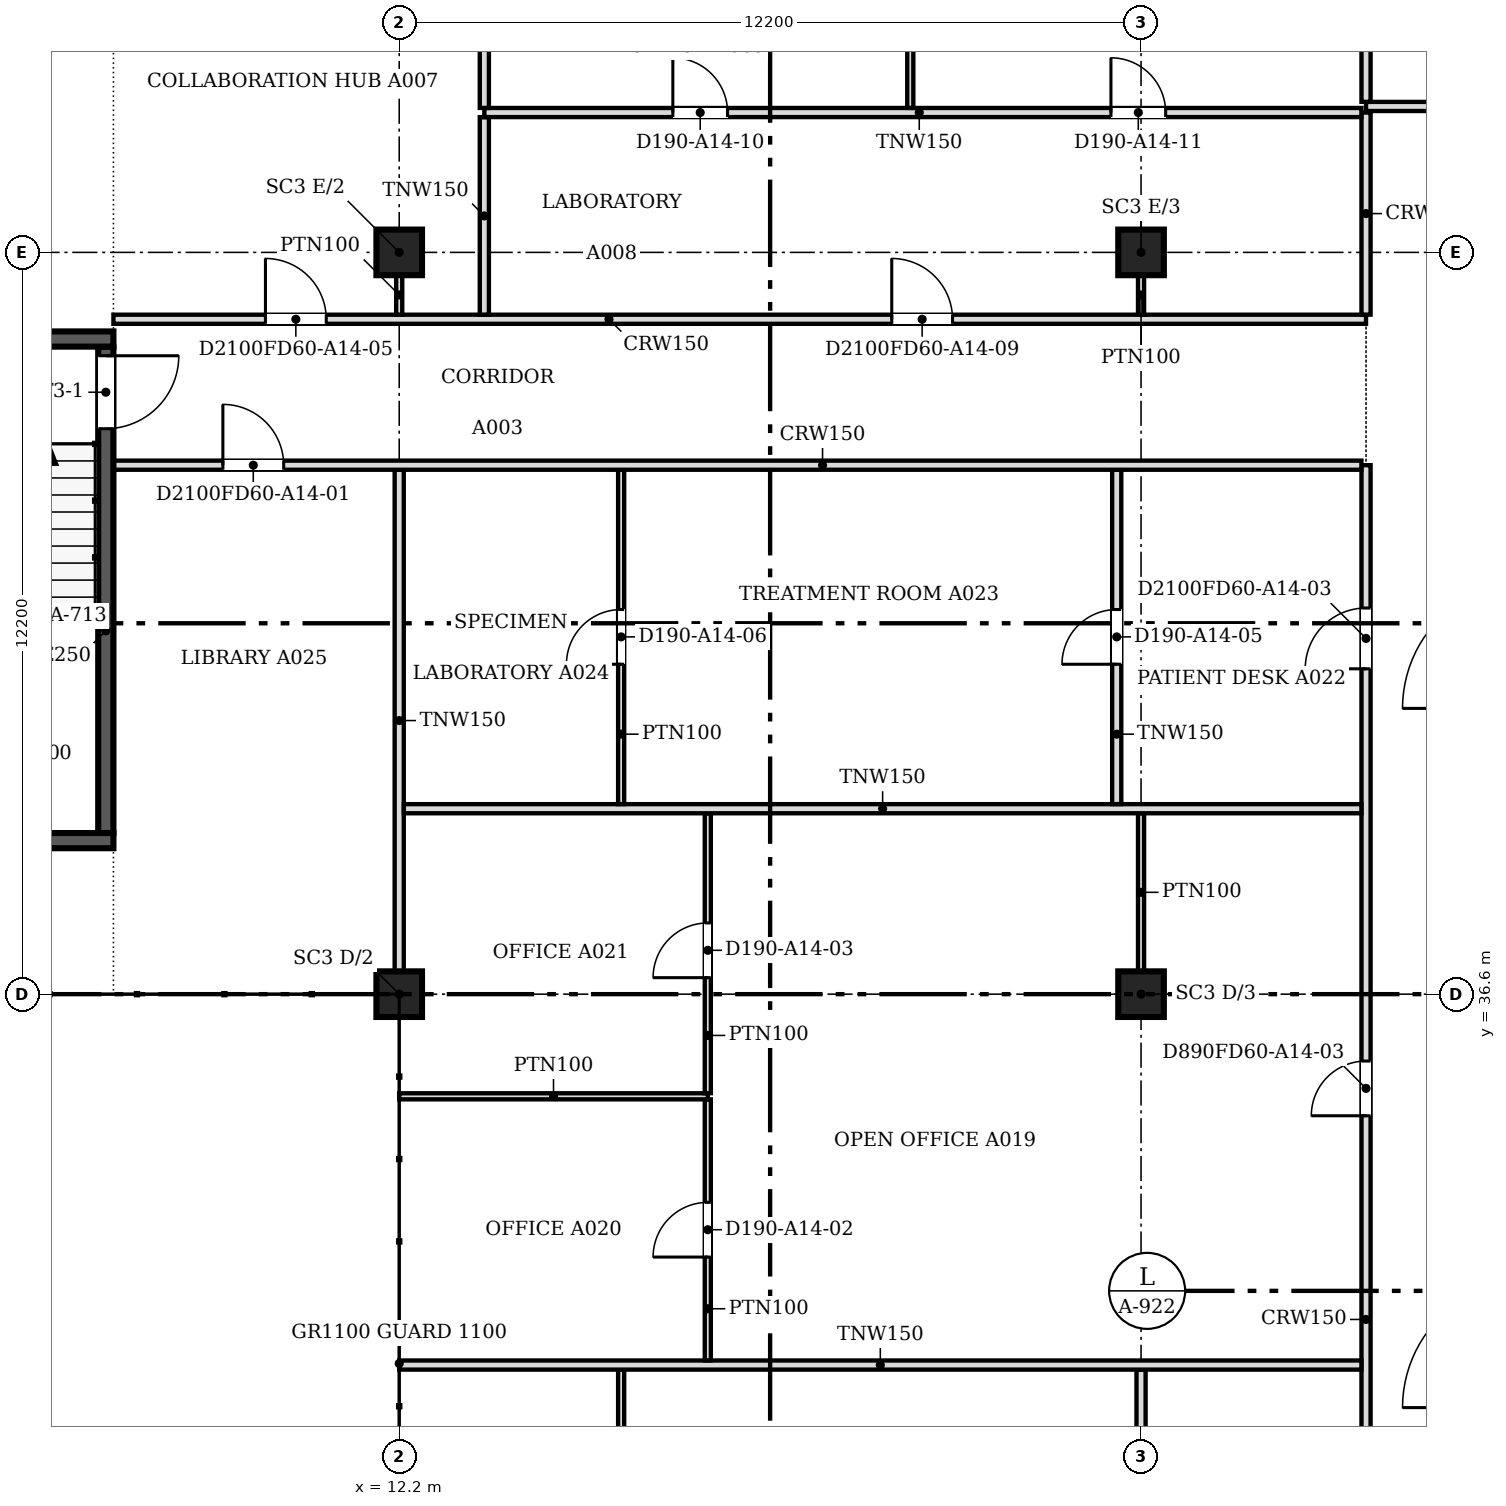
"""IFC4 building model, lengths in metres.
Left out: names, types, materials, properties, quantities, classifications, styles, units other than length and angle.
Written with IfcOpenShell. Run it as: python <this file> out.ifc"""

import sys

from ifc_helpers import new_model, si_unit, direction, frame, frame_2d, origin, origin_2d, place, context, subcontext, project, spatial, rectangle, extrude, source, transform, mapped, element, fill, save


model = new_model("IFC4")
c1 = context("Model", 3, precision=1e-05, world=origin(), true_north=direction((0.0, 1.0)))
c2 = subcontext(c1, "Body", "Model", "MODEL_VIEW")
j1 = project(units=[si_unit("LENGTHUNIT", "METRE"), si_unit("PLANEANGLEUNIT", "RADIAN")], contexts=[c1])
p1 = place(None, origin())
s1 = spatial("IfcSite", under=j1, at=p1, CompositionType="ELEMENT")
p2 = place(p1, origin())
s2 = spatial("IfcBuilding", under=s1, at=p2, CompositionType="ELEMENT")
p3 = place(p2, frame((0.0, 0.0, 155.4)))
s3 = spatial("IfcBuildingStorey", under=s2, at=p3, CompositionType="ELEMENT", Elevation=155.4)
for number, where, z_axis, x_axis in (
    (1, (12.2, 36.6, 0.0), (0.0, 0.0, 1.0), (1.0, 0.0, 0.0)),
    (2, (12.2, 48.8, 0.0), (0.0, 0.0, 1.0), (1.0, 0.0, 0.0)),
    (3, (24.4, 36.6, 0.0), (0.0, 0.0, 1.0), (1.0, 0.0, 0.0)),
    (4, (24.4, 48.8, 0.0), (0.0, 0.0, 1.0), (1.0, 0.0, 0.0)),
):
    element("IfcColumn", number, at=place(p3, frame(where, z_axis=z_axis, x_axis=x_axis)), inside=s3, PredefinedType="COLUMN", context=c2, shape_type="SweptSolid", body=[
        extrude(rectangle(XDim=0.75, YDim=0.75, at=origin_2d()), origin(), (0.0, 0.0, 1.0), 3.6),
    ])
for number, where, z_axis, x_axis in (
    (5, (7.5, 39.125, 0.0), (0.0, 0.0, 1.0), (-1.0, 0.0, 0.0)),
    (6, (3.6, 47.375, 0.0), (0.0, 0.0, 1.0), (1.0, 0.0, 0.0)),
):
    element("IfcWall", number, at=place(p3, frame(where, z_axis=z_axis, x_axis=x_axis)), inside=s3, PredefinedType="SOLIDWALL", context=c2, shape_type="SweptSolid", body=[
        extrude(rectangle(XDim=3.9, YDim=0.25, at=frame_2d((1.95, 0.0))), origin(), (0.0, 0.0, 1.0), 3.8),
    ])
p4 = place(p3, frame((7.375, 47.25, 0.0), z_axis=(0.0, 0.0, 1.0), x_axis=(0.0, -1.0, 0.0)))
e7 = element("IfcWall", 7, at=p4, inside=s3, PredefinedType="SOLIDWALL", context=c2, shape_type="SweptSolid", body=[
    extrude(rectangle(XDim=8.0, YDim=0.25, at=frame_2d((4.0, 0.0))), origin(), (0.0, 0.0, 1.0), 3.8),
])
m1 = source(origin(), c2, "Body", "SweptSolid", [
    extrude(rectangle(XDim=1.2, YDim=2.1, at=frame_2d((0.6, 1.05))), frame((0.0, 0.135, 0.0), z_axis=(0.0, -1.0, 0.0), x_axis=(1.0, 0.0, 0.0)), (0.0, 0.0, 1.0), 0.27),
])
p5 = place(p4, frame((0.15, 0.0, 0.0)))
e8 = element("IfcOpeningElement", 8, at=p5, cuts=e7, PredefinedType="OPENING", context=c2, shape_type="MappedRepresentation", body=[
    mapped(m1, transform((0.0, 0.0, 0.0), scale=1.0)),
])
p6 = place(p3, frame((28.1, 18.8, 0.0), z_axis=(0.0, 0.0, 1.0), x_axis=(0.0, 1.0, 0.0)))
e9 = element("IfcWall", 9, at=p6, inside=s3, PredefinedType="PARTITIONING", context=c2, shape_type="SweptSolid", body=[
    extrude(rectangle(XDim=26.5, YDim=0.15, at=frame_2d((13.25, 0.0))), origin(), (0.0, 0.0, 1.0), 3.067),
])
m2 = source(origin(), c2, "Body", "SweptSolid", [
    extrude(rectangle(XDim=0.9, YDim=2.1, at=frame_2d((0.45, 1.05))), frame((0.0, 0.085, 0.0), z_axis=(0.0, -1.0, 0.0), x_axis=(1.0, 0.0, 0.0)), (0.0, 0.0, 1.0), 0.17),
])
p7 = place(p6, frame((1.1, 0.0, 0.0)))
e10 = element("IfcOpeningElement", 10, at=p7, cuts=e9, PredefinedType="OPENING", context=c2, shape_type="MappedRepresentation", body=[
    mapped(m2, transform((0.0, 0.0, 0.0), scale=1.0)),
])
m3 = source(origin(), c2, "Body", "SweptSolid", [
    extrude(rectangle(XDim=1.0, YDim=2.1, at=frame_2d((0.5, 1.05))), frame((0.0, 0.085, 0.0), z_axis=(0.0, -1.0, 0.0), x_axis=(1.0, 0.0, 0.0)), (0.0, 0.0, 1.0), 0.17),
])
p8 = place(p6, frame((23.151, 0.0, 0.0)))
e11 = element("IfcOpeningElement", 11, at=p8, cuts=e9, PredefinedType="OPENING", context=c2, shape_type="MappedRepresentation", body=[
    mapped(m3, transform((0.0, 0.0, 0.0), scale=1.0)),
])
p9 = place(p6, frame((8.1, 0.0, 0.0)))
e12 = element("IfcOpeningElement", 12, at=p9, cuts=e9, PredefinedType="OPENING", context=c2, shape_type="MappedRepresentation", body=[
    mapped(m3, transform((0.0, 0.0, 0.0), scale=1.0)),
])
p10 = place(p6, frame((15.8, 0.0, 0.0)))
e13 = element("IfcOpeningElement", 13, at=p10, cuts=e9, PredefinedType="OPENING", context=c2, shape_type="MappedRepresentation", body=[
    mapped(m2, transform((0.0, 0.0, 0.0), scale=1.0)),
])
p11 = place(p3, frame((15.85, 24.476, 0.0), z_axis=(0.0, 0.0, 1.0), x_axis=(0.0, 1.0, 0.0)))
e14 = element("IfcWall", 14, at=p11, inside=s3, PredefinedType="PARTITIONING", context=c2, shape_type="SweptSolid", body=[
    extrude(rectangle(XDim=5.948, YDim=0.1, at=frame_2d((2.974, 0.0))), origin(), (0.0, 0.0, 1.0), 3.067),
])
m4 = source(origin(), c2, "Body", "SweptSolid", [
    extrude(rectangle(XDim=0.9, YDim=2.1, at=frame_2d((0.45, 1.05))), frame((0.0, 0.06, 0.0), z_axis=(0.0, -1.0, 0.0), x_axis=(1.0, 0.0, 0.0)), (0.0, 0.0, 1.0), 0.12),
])
p12 = place(p11, frame((2.5, 0.0, 0.0)))
e15 = element("IfcOpeningElement", 15, at=p12, cuts=e14, PredefinedType="OPENING", context=c2, shape_type="MappedRepresentation", body=[
    mapped(m4, transform((0.0, 0.0, 0.0), scale=1.0)),
])
p13 = place(p3, frame((24.4, 24.776, 0.0), z_axis=(0.0, 0.0, 1.0), x_axis=(0.0, 1.0, 0.0)))
e16 = element("IfcWall", 16, at=p13, inside=s3, PredefinedType="PARTITIONING", context=c2, shape_type="SweptSolid", body=[
    extrude(rectangle(XDim=5.648, YDim=0.15, at=frame_2d((2.824, 0.0))), origin(), (0.0, 0.0, 1.0), 3.067),
])
p14 = place(p13, frame((2.4, 0.0, 0.0)))
e17 = element("IfcOpeningElement", 17, at=p14, cuts=e16, PredefinedType="OPENING", context=c2, shape_type="MappedRepresentation", body=[
    mapped(m2, transform((0.0, 0.0, 0.0), scale=1.0)),
])
p15 = place(p3, frame((12.2, 30.5, 0.0), z_axis=(0.0, 0.0, 1.0), x_axis=(1.0, 0.0, 0.0)))
e18 = element("IfcWall", 18, at=p15, inside=s3, PredefinedType="PARTITIONING", context=c2, shape_type="SweptSolid", body=[
    extrude(rectangle(XDim=15.824, YDim=0.15, at=frame_2d((7.912, 0.0))), origin(), (0.0, 0.0, 1.0), 3.067),
])
p16 = place(p3, frame((17.275, 30.576, 0.0), z_axis=(0.0, 0.0, 1.0), x_axis=(0.0, 1.0, 0.0)))
e19 = element("IfcWall", 19, at=p16, inside=s3, PredefinedType="PARTITIONING", context=c2, shape_type="SweptSolid", body=[
    extrude(rectangle(XDim=4.293, YDim=0.1, at=frame_2d((2.147, 0.0))), origin(), (0.0, 0.0, 1.0), 3.067),
])
p17 = place(p16, frame((1.7, 0.0, 0.0)))
e20 = element("IfcOpeningElement", 20, at=p17, cuts=e19, PredefinedType="OPENING", context=c2, shape_type="MappedRepresentation", body=[
    mapped(m4, transform((0.0, 0.0, 0.0), scale=1.0)),
])
p18 = place(p3, frame((12.2, 34.92, 0.0), z_axis=(0.0, 0.0, 1.0), x_axis=(1.0, 0.0, 0.0)))
e21 = element("IfcWall", 21, at=p18, inside=s3, PredefinedType="PARTITIONING", context=c2, shape_type="SweptSolid", body=[
    extrude(rectangle(XDim=5.075, YDim=0.1, at=frame_2d((2.538, 0.0))), origin(), (0.0, 0.0, 1.0), 3.067),
])
p19 = place(p3, frame((17.275, 34.971, 0.0), z_axis=(0.0, 0.0, 1.0), x_axis=(0.0, 1.0, 0.0)))
e22 = element("IfcWall", 22, at=p19, inside=s3, PredefinedType="PARTITIONING", context=c2, shape_type="SweptSolid", body=[
    extrude(rectangle(XDim=4.603, YDim=0.1, at=frame_2d((2.301, 0.0))), origin(), (0.0, 0.0, 1.0), 3.067),
])
p20 = place(p19, frame((1.9, 0.0, 0.0)))
e23 = element("IfcOpeningElement", 23, at=p20, cuts=e22, PredefinedType="OPENING", context=c2, shape_type="MappedRepresentation", body=[
    mapped(m4, transform((0.0, 0.0, 0.0), scale=1.0)),
])
p21 = place(p3, frame((12.2, 36.976, 0.0), z_axis=(0.0, 0.0, 1.0), x_axis=(0.0, 1.0, 0.0)))
e24 = element("IfcWall", 24, at=p21, inside=s3, PredefinedType="PARTITIONING", context=c2, shape_type="SweptSolid", body=[
    extrude(rectangle(XDim=8.248, YDim=0.15, at=frame_2d((4.124, 0.0))), origin(), (0.0, 0.0, 1.0), 3.067),
])
p22 = place(p3, frame((24.4, 36.975, 0.0), z_axis=(0.0, 0.0, 1.0), x_axis=(0.0, 1.0, 0.0)))
e25 = element("IfcWall", 25, at=p22, inside=s3, PredefinedType="PARTITIONING", context=c2, shape_type="SweptSolid", body=[
    extrude(rectangle(XDim=2.6, YDim=0.1, at=frame_2d((1.3, 0.0))), origin(), (0.0, 0.0, 1.0), 3.067),
])
p23 = place(p3, frame((12.276, 39.65, 0.0), z_axis=(0.0, 0.0, 1.0), x_axis=(1.0, 0.0, 0.0)))
e26 = element("IfcWall", 26, at=p23, inside=s3, PredefinedType="PARTITIONING", context=c2, shape_type="SweptSolid", body=[
    extrude(rectangle(XDim=15.748, YDim=0.15, at=frame_2d((7.874, 0.0))), origin(), (0.0, 0.0, 1.0), 3.067),
])
p24 = place(p3, frame((15.85, 39.726, 0.0), z_axis=(0.0, 0.0, 1.0), x_axis=(0.0, 1.0, 0.0)))
e27 = element("IfcWall", 27, at=p24, inside=s3, PredefinedType="PARTITIONING", context=c2, shape_type="SweptSolid", body=[
    extrude(rectangle(XDim=5.498, YDim=0.1, at=frame_2d((2.749, 0.0))), origin(), (0.0, 0.0, 1.0), 3.067),
])
p25 = place(p24, frame((2.3, 0.0, 0.0)))
e28 = element("IfcOpeningElement", 28, at=p25, cuts=e27, PredefinedType="OPENING", context=c2, shape_type="MappedRepresentation", body=[
    mapped(m4, transform((0.0, 0.0, 0.0), scale=1.0)),
])
p26 = place(p3, frame((24.0, 39.726, 0.0), z_axis=(0.0, 0.0, 1.0), x_axis=(0.0, 1.0, 0.0)))
e29 = element("IfcWall", 29, at=p26, inside=s3, PredefinedType="PARTITIONING", context=c2, shape_type="SweptSolid", body=[
    extrude(rectangle(XDim=5.498, YDim=0.15, at=frame_2d((2.749, 0.0))), origin(), (0.0, 0.0, 1.0), 3.067),
])
p27 = place(p26, frame((2.3, 0.0, 0.0)))
e30 = element("IfcOpeningElement", 30, at=p27, cuts=e29, PredefinedType="OPENING", context=c2, shape_type="MappedRepresentation", body=[
    mapped(m2, transform((0.0, 0.0, 0.0), scale=1.0)),
])
p28 = place(p3, frame((28.024, 45.3, 0.0), z_axis=(0.0, 0.0, 1.0), x_axis=(-1.0, 0.0, 0.0)))
e31 = element("IfcWall", 31, at=p28, inside=s3, PredefinedType="PARTITIONING", context=c2, shape_type="SweptSolid", body=[
    extrude(rectangle(XDim=20.524, YDim=0.15, at=frame_2d((10.262, 0.0))), origin(), (0.0, 0.0, 1.0), 3.067),
])
p29 = place(p28, frame((17.724, 0.0, 0.0)))
e32 = element("IfcOpeningElement", 32, at=p29, cuts=e31, PredefinedType="OPENING", context=c2, shape_type="MappedRepresentation", body=[
    mapped(m3, transform((0.0, 0.0, 0.0), scale=1.0)),
])
p30 = place(p3, frame((7.5, 47.7, 0.0), z_axis=(0.0, 0.0, 1.0), x_axis=(1.0, 0.0, 0.0)))
e33 = element("IfcWall", 33, at=p30, inside=s3, PredefinedType="PARTITIONING", context=c2, shape_type="SweptSolid", body=[
    extrude(rectangle(XDim=20.6, YDim=0.15, at=frame_2d((10.3, 0.0))), origin(), (0.0, 0.0, 1.0), 3.067),
])
p31 = place(p30, frame((2.5, 0.0, 0.0)))
e34 = element("IfcOpeningElement", 34, at=p31, cuts=e33, PredefinedType="OPENING", context=c2, shape_type="MappedRepresentation", body=[
    mapped(m3, transform((0.0, 0.0, 0.0), scale=1.0)),
])
p32 = place(p30, frame((12.8, 0.0, 0.0)))
e35 = element("IfcOpeningElement", 35, at=p32, cuts=e33, PredefinedType="OPENING", context=c2, shape_type="MappedRepresentation", body=[
    mapped(m3, transform((0.0, 0.0, 0.0), scale=1.0)),
])
p33 = place(p3, frame((13.6, 47.776, 0.0), z_axis=(0.0, 0.0, 1.0), x_axis=(0.0, 1.0, 0.0)))
e36 = element("IfcWall", 36, at=p33, inside=s3, PredefinedType="PARTITIONING", context=c2, shape_type="SweptSolid", body=[
    extrude(rectangle(XDim=3.248, YDim=0.15, at=frame_2d((1.624, 0.0))), origin(), (0.0, 0.0, 1.0), 3.067),
])
p34 = place(p3, frame((28.1, 47.776, 0.0), z_axis=(0.0, 0.0, 1.0), x_axis=(0.0, 1.0, 0.0)))
e37 = element("IfcWall", 37, at=p34, inside=s3, PredefinedType="PARTITIONING", context=c2, shape_type="SweptSolid", body=[
    extrude(rectangle(XDim=3.324, YDim=0.15, at=frame_2d((1.662, 0.0))), origin(), (0.0, 0.0, 1.0), 3.067),
])
for number, where, z_axis, x_axis in (
    (38, (12.2, 48.425, 0.0), (0.0, 0.0, 1.0), (0.0, -1.0, 0.0)),
    (39, (24.4, 48.425, 0.0), (0.0, 0.0, 1.0), (0.0, -1.0, 0.0)),
):
    element("IfcWall", number, at=place(p3, frame(where, z_axis=z_axis, x_axis=x_axis)), inside=s3, PredefinedType="PARTITIONING", context=c2, shape_type="SweptSolid", body=[
        extrude(rectangle(XDim=0.65, YDim=0.1, at=frame_2d((0.325, 0.0))), origin(), (0.0, 0.0, 1.0), 3.067),
    ])
p35 = place(p3, frame((13.6, 51.1, 0.0), z_axis=(0.0, 0.0, 1.0), x_axis=(1.0, 0.0, 0.0)))
e40 = element("IfcWall", 40, at=p35, inside=s3, PredefinedType="PARTITIONING", context=c2, shape_type="SweptSolid", body=[
    extrude(rectangle(XDim=14.424, YDim=0.15, at=frame_2d((7.212, 0.0))), origin(), (0.0, 0.0, 1.0), 3.067),
])
p36 = place(p35, frame((3.1, 0.0, 0.0)))
e41 = element("IfcOpeningElement", 41, at=p36, cuts=e40, PredefinedType="OPENING", context=c2, shape_type="MappedRepresentation", body=[
    mapped(m2, transform((0.0, 0.0, 0.0), scale=1.0)),
])
p37 = place(p35, frame((10.305, 0.0, 0.0)))
e42 = element("IfcOpeningElement", 42, at=p37, cuts=e40, PredefinedType="OPENING", context=c2, shape_type="MappedRepresentation", body=[
    mapped(m2, transform((0.0, 0.0, 0.0), scale=1.0)),
])
p38 = place(p3, frame((13.6, 51.176, 0.0), z_axis=(0.0, 0.0, 1.0), x_axis=(0.0, 1.0, 0.0)))
e43 = element("IfcWall", 43, at=p38, inside=s3, PredefinedType="PARTITIONING", context=c2, shape_type="SweptSolid", body=[
    extrude(rectangle(XDim=3.224, YDim=0.15, at=frame_2d((1.612, 0.0))), origin(), (0.0, 0.0, 1.0), 3.067),
])
p39 = place(p3, frame((20.605, 51.176, 0.0), z_axis=(0.0, 0.0, 1.0), x_axis=(0.0, 1.0, 0.0)))
e44 = element("IfcWall", 44, at=p39, inside=s3, PredefinedType="PARTITIONING", context=c2, shape_type="SweptSolid", body=[
    extrude(rectangle(XDim=3.224, YDim=0.1, at=frame_2d((1.612, 0.0))), origin(), (0.0, 0.0, 1.0), 3.067),
])
p40 = place(p3, frame((28.1, 51.2, 0.0), z_axis=(0.0, 0.0, 1.0), x_axis=(1.0, 0.0, 0.0)))
e45 = element("IfcWall", 45, at=p40, inside=s3, PredefinedType="PARTITIONING", context=c2, shape_type="SweptSolid", body=[
    extrude(rectangle(XDim=31.438, YDim=0.15, at=frame_2d((15.719, 0.0))), origin(), (0.0, 0.0, 1.0), 3.067),
])
p41 = place(p40, frame((7.0, 0.0, 0.0)))
e46 = element("IfcOpeningElement", 46, at=p41, cuts=e45, PredefinedType="OPENING", context=c2, shape_type="MappedRepresentation", body=[
    mapped(m2, transform((0.0, 0.0, 0.0), scale=1.0)),
])
p42 = place(p40, frame((22.8, 0.0, 0.0)))
e47 = element("IfcOpeningElement", 47, at=p42, cuts=e45, PredefinedType="OPENING", context=c2, shape_type="MappedRepresentation", body=[
    mapped(m2, transform((0.0, 0.0, 0.0), scale=1.0)),
])
p43 = place(p3, frame((28.1, 51.276, 0.0), z_axis=(0.0, 0.0, 1.0), x_axis=(0.0, 1.0, 0.0)))
e48 = element("IfcWall", 48, at=p43, inside=s3, PredefinedType="PARTITIONING", context=c2, shape_type="SweptSolid", body=[
    extrude(rectangle(XDim=3.124, YDim=0.15, at=frame_2d((1.562, 0.0))), origin(), (0.0, 0.0, 1.0), 3.067),
])
m5 = source(origin(), c2, "Body", "SweptSolid", [
    extrude(rectangle(XDim=1.2, YDim=2.1, at=frame_2d((0.6, 1.05))), frame((0.0, 0.025, 0.0), z_axis=(0.0, -1.0, 0.0), x_axis=(1.0, 0.0, 0.0)), (0.0, 0.0, 1.0), 0.05),
])
p44 = place(p5, origin())
e49 = element("IfcDoor", 49, at=p44, inside=s3, OperationType="SINGLE_SWING_LEFT", PredefinedType="DOOR", context=c2, shape_type="MappedRepresentation", body=[
    mapped(m5, transform((0.0, 0.0, 0.0), scale=1.0)),
])
fill(e8, e49)
m6 = source(origin(), c2, "Body", "SweptSolid", [
    extrude(rectangle(XDim=0.9, YDim=2.1, at=frame_2d((0.45, 1.05))), frame((0.0, 0.025, 0.0), z_axis=(0.0, -1.0, 0.0), x_axis=(1.0, 0.0, 0.0)), (0.0, 0.0, 1.0), 0.05),
])
p45 = place(p17, origin())
e50 = element("IfcDoor", 50, at=p45, inside=s3, OperationType="SINGLE_SWING_LEFT", PredefinedType="DOOR", context=c2, shape_type="MappedRepresentation", body=[
    mapped(m6, transform((0.0, 0.0, 0.0), scale=1.0)),
])
fill(e20, e50)
p46 = place(p20, origin())
e51 = element("IfcDoor", 51, at=p46, inside=s3, OperationType="SINGLE_SWING_LEFT", PredefinedType="DOOR", context=c2, shape_type="MappedRepresentation", body=[
    mapped(m6, transform((0.0, 0.0, 0.0), scale=1.0)),
])
fill(e23, e51)
m7 = source(origin(), c2, "Body", "SweptSolid", [
    extrude(rectangle(XDim=1.0, YDim=2.1, at=frame_2d((0.5, 1.05))), frame((0.0, 0.025, 0.0), z_axis=(0.0, -1.0, 0.0), x_axis=(1.0, 0.0, 0.0)), (0.0, 0.0, 1.0), 0.05),
])
p47 = place(p29, origin())
e52 = element("IfcDoor", 52, at=p47, inside=s3, OperationType="SINGLE_SWING_RIGHT", PredefinedType="DOOR", context=c2, shape_type="MappedRepresentation", body=[
    mapped(m7, transform((0.0, 0.0, 0.0), scale=1.0)),
])
fill(e32, e52)
p48 = place(p27, origin())
e53 = element("IfcDoor", 53, at=p48, inside=s3, OperationType="SINGLE_SWING_LEFT", PredefinedType="DOOR", context=c2, shape_type="MappedRepresentation", body=[
    mapped(m6, transform((0.0, 0.0, 0.0), scale=1.0)),
])
fill(e30, e53)
p49 = place(p25, origin())
e54 = element("IfcDoor", 54, at=p49, inside=s3, OperationType="SINGLE_SWING_LEFT", PredefinedType="DOOR", context=c2, shape_type="MappedRepresentation", body=[
    mapped(m6, transform((0.0, 0.0, 0.0), scale=1.0)),
])
fill(e28, e54)
p50 = place(p8, origin())
e55 = element("IfcDoor", 55, at=p50, inside=s3, OperationType="SINGLE_SWING_LEFT", PredefinedType="DOOR", context=c2, shape_type="MappedRepresentation", body=[
    mapped(m7, transform((0.0, 0.0, 0.0), scale=1.0)),
])
fill(e11, e55)
p51 = place(p31, origin())
e56 = element("IfcDoor", 56, at=p51, inside=s3, OperationType="SINGLE_SWING_LEFT", PredefinedType="DOOR", context=c2, shape_type="MappedRepresentation", body=[
    mapped(m7, transform((0.0, 0.0, 0.0), scale=1.0)),
])
fill(e34, e56)
p52 = place(p36, origin())
e57 = element("IfcDoor", 57, at=p52, inside=s3, OperationType="SINGLE_SWING_LEFT", PredefinedType="DOOR", context=c2, shape_type="MappedRepresentation", body=[
    mapped(m6, transform((0.0, 0.0, 0.0), scale=1.0)),
])
fill(e41, e57)
p53 = place(p37, origin())
e58 = element("IfcDoor", 58, at=p53, inside=s3, OperationType="SINGLE_SWING_LEFT", PredefinedType="DOOR", context=c2, shape_type="MappedRepresentation", body=[
    mapped(m6, transform((0.0, 0.0, 0.0), scale=1.0)),
])
fill(e42, e58)
p54 = place(p10, origin())
e59 = element("IfcDoor", 59, at=p54, inside=s3, OperationType="SINGLE_SWING_LEFT", PredefinedType="DOOR", context=c2, shape_type="MappedRepresentation", body=[
    mapped(m6, transform((0.0, 0.0, 0.0), scale=1.0)),
])
fill(e13, e59)
p55 = place(p32, origin())
e60 = element("IfcDoor", 60, at=p55, inside=s3, OperationType="SINGLE_SWING_LEFT", PredefinedType="DOOR", context=c2, shape_type="MappedRepresentation", body=[
    mapped(m7, transform((0.0, 0.0, 0.0), scale=1.0)),
])
fill(e35, e60)
save(model, sys.argv[1])
